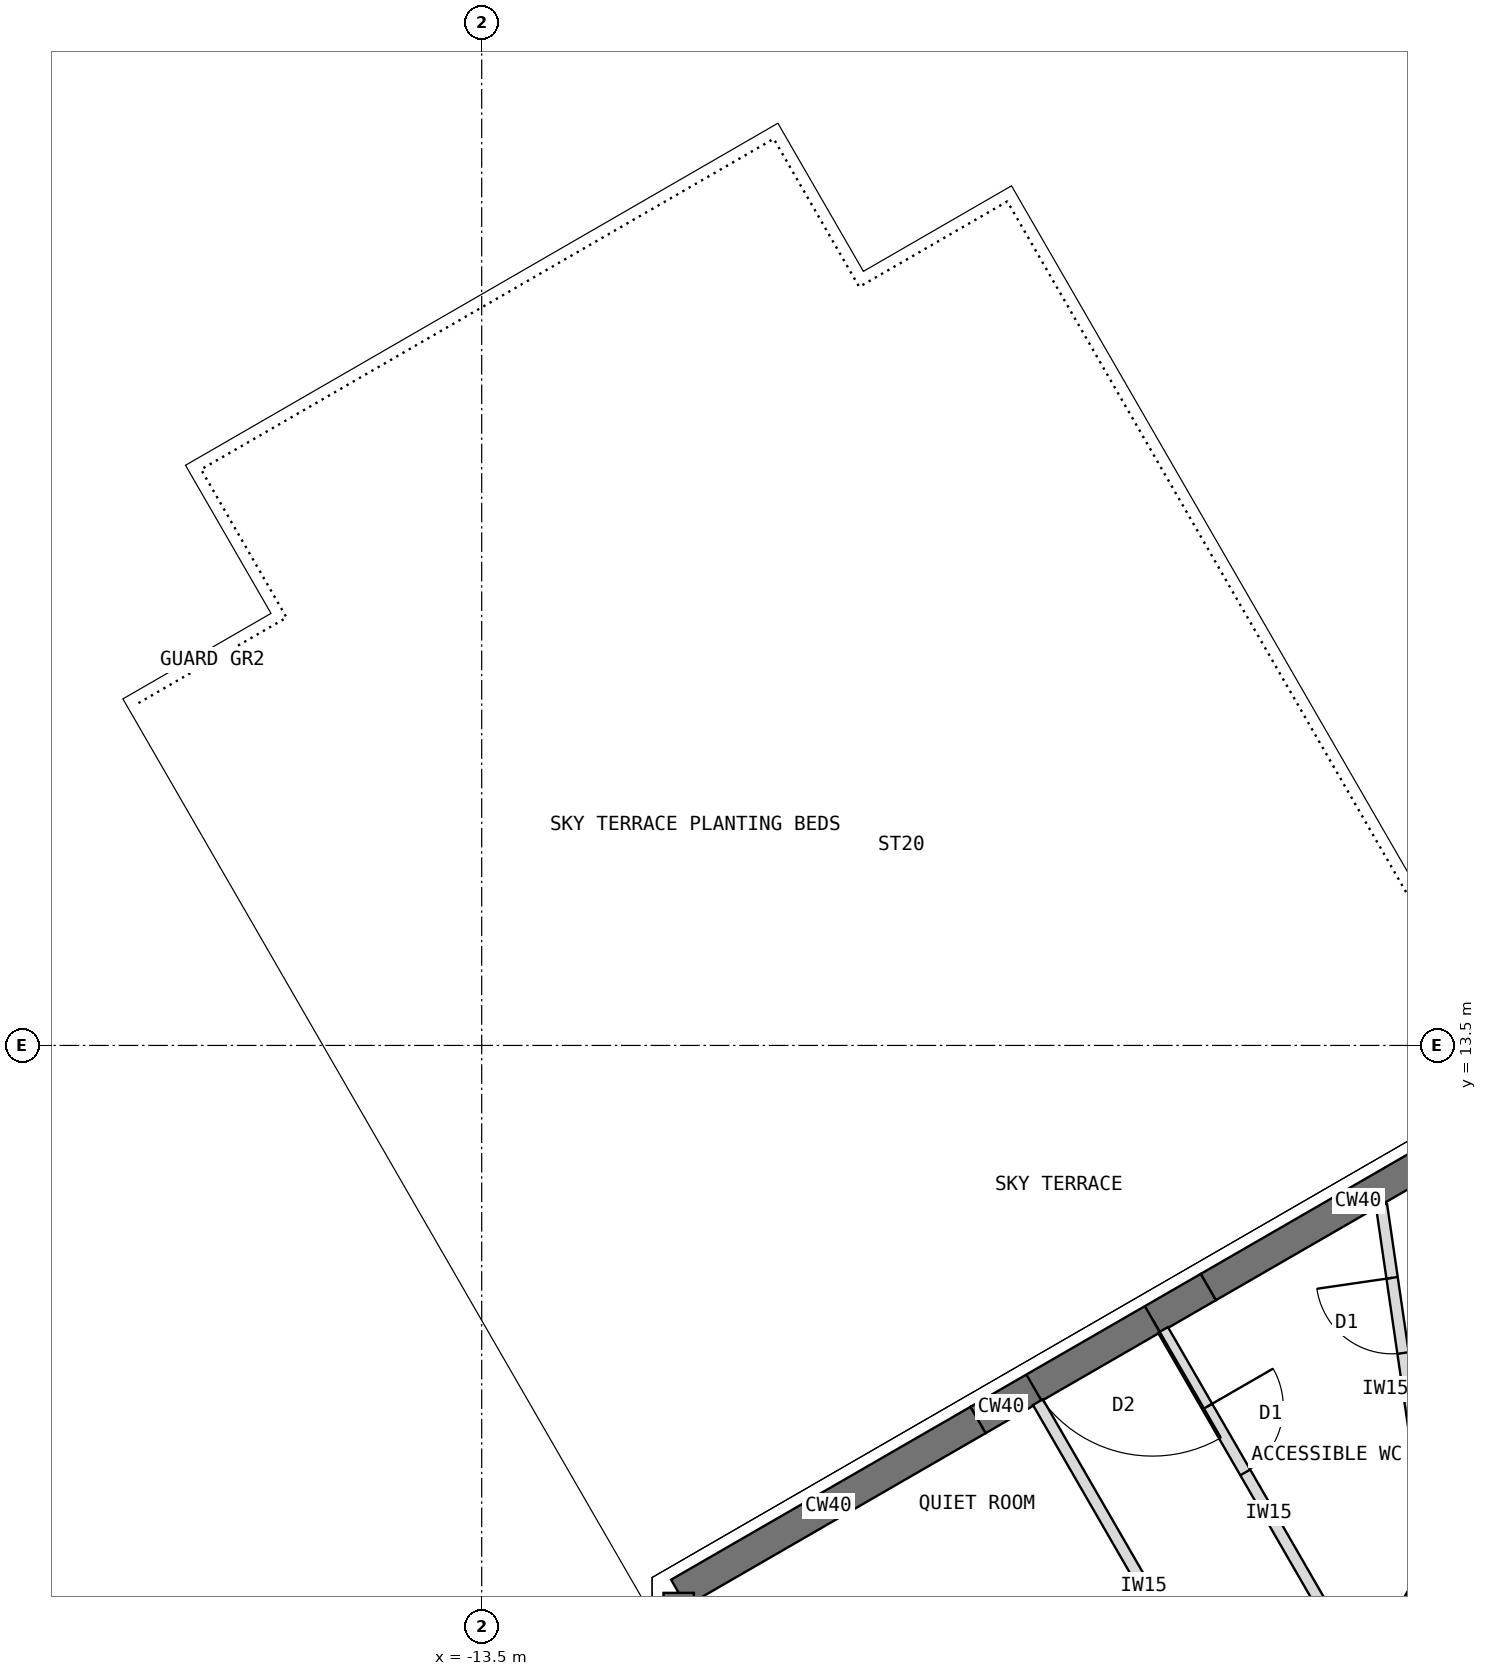
"""IFC4 building model, lengths in metres.
Left out: names, types, materials, properties, quantities, classifications, styles, units other than length and angle.
Written with IfcOpenShell. Run it as: python <this file> out.ifc"""

import sys

from ifc_helpers import new_model, si_unit, direction, frame, frame_2d, origin, place, context, subcontext, project, spatial, rectangle, extrude, element, fill, save


model = new_model("IFC4")
c1 = context("Model", 3, precision=1e-05, world=origin(), true_north=direction((0.0, 1.0)))
c2 = subcontext(c1, "Body", "Model", "MODEL_VIEW")
j1 = project(units=[si_unit("LENGTHUNIT", "METRE"), si_unit("PLANEANGLEUNIT", "RADIAN")], contexts=[c1])
p1 = place(None, origin())
s1 = spatial("IfcSite", under=j1, at=p1, CompositionType="ELEMENT")
p2 = place(p1, origin())
s2 = spatial("IfcBuilding", under=s1, at=p2, CompositionType="ELEMENT")
p3 = place(p2, frame((0.0, 0.0, 243.5)))
s3 = spatial("IfcBuildingStorey", under=s2, at=p3, CompositionType="ELEMENT", Elevation=243.5)
p4 = place(p3, frame((0.0, 12.596, 0.0), z_axis=(0.0, 0.0, 1.0), x_axis=(-0.866011268655, -0.500024481964, 0.0)))
e1 = element("IfcWall", 1, at=p4, inside=s3, PredefinedType="SHEAR", context=c2, shape_type="SweptSolid", body=[
    extrude(rectangle(XDim=4.548, YDim=0.4, at=frame_2d((2.274, 0.0))), origin(), (0.0, 0.0, 1.0), 4.0),
])
p5 = place(p3, frame((-3.939, 10.322, 0.0), z_axis=(0.0, 0.0, 1.0), x_axis=(-0.866019471182, -0.500010275428, 0.0)))
e2 = element("IfcWall", 2, at=p5, inside=s3, PredefinedType="SHEAR", context=c2, shape_type="SweptSolid", body=[
    extrude(rectangle(XDim=3.5, YDim=0.4, at=frame_2d((1.75, 0.0))), origin(), (0.0, 0.0, 1.0), 4.0),
])
p6 = place(p5, frame((0.85, 0.0, 0.0)))
e3 = element("IfcOpeningElement", 3, at=p6, cuts=e2, PredefinedType="OPENING", context=c2, shape_type="SweptSolid", body=[
    extrude(rectangle(XDim=1.8, YDim=2.1, at=frame_2d((0.9, 1.05))), frame((0.0, 0.21, 0.0), z_axis=(0.0, -1.0, 0.0), x_axis=(1.0, 0.0, 0.0)), (0.0, 0.0, 1.0), 0.42),
])
p7 = place(p3, frame((-6.97, 8.572, 0.0), z_axis=(0.0, 0.0, 1.0), x_axis=(-0.866034513004, -0.499984222037, 0.0)))
e4 = element("IfcWall", 4, at=p7, inside=s3, PredefinedType="SHEAR", context=c2, shape_type="SweptSolid", body=[
    extrude(rectangle(XDim=4.548, YDim=0.4, at=frame_2d((2.274, 0.0))), origin(), (0.0, 0.0, 1.0), 4.0),
])
p8 = place(p3, frame((-10.908, 6.298, 0.0), z_axis=(0.0, 0.0, 1.0), x_axis=(0.0, -1.0, 0.0)))
e5 = element("IfcWall", 5, at=p8, inside=s3, PredefinedType="SHEAR", context=c2, shape_type="SweptSolid", body=[
    extrude(rectangle(XDim=12.596, YDim=0.4, at=frame_2d((6.298, 0.0))), origin(), (0.0, 0.0, 1.0), 4.0),
])
p9 = place(p3, frame((-1.201, 6.12, 0.0), z_axis=(0.0, 0.0, 1.0), x_axis=(0.499997979876, 0.866026570101, 0.0)))
e6 = element("IfcWall", 6, at=p9, inside=s3, PredefinedType="SHEAR", context=c2, shape_type="SweptSolid", body=[
    extrude(rectangle(XDim=6.008, YDim=0.4, at=frame_2d((3.004, 0.0))), origin(), (0.0, 0.0, 1.0), 4.0),
])
p10 = place(p3, frame((-3.396, 3.983, 0.0), z_axis=(0.0, 0.0, 1.0), x_axis=(-0.499980410194, 0.866036713669, 0.0)))
e7 = element("IfcWall", 7, at=p10, inside=s3, PredefinedType="PARTITIONING", context=c2, shape_type="SweptSolid", body=[
    extrude(rectangle(XDim=5.571, YDim=0.15, at=frame_2d((2.786, 0.0))), origin(), (0.0, 0.0, 1.0), 3.8),
])
p11 = place(p10, frame((1.186, 0.0, 0.0)))
e8 = element("IfcOpeningElement", 8, at=p11, cuts=e7, PredefinedType="OPENING", context=c2, shape_type="SweptSolid", body=[
    extrude(rectangle(XDim=1.0, YDim=2.1, at=frame_2d((0.5, 1.05))), frame((0.0, 0.085, 0.0), z_axis=(0.0, -1.0, 0.0), x_axis=(1.0, 0.0, 0.0)), (0.0, 0.0, 1.0), 0.17),
])
p12 = place(p3, frame((-4.536, 9.757, 0.0), z_axis=(0.0, 0.0, 1.0), x_axis=(0.499980410194, -0.866036713669, 0.0)))
e9 = element("IfcWall", 9, at=p12, inside=s3, PredefinedType="PARTITIONING", context=c2, shape_type="SweptSolid", body=[
    extrude(rectangle(XDim=5.571, YDim=0.15, at=frame_2d((2.786, 0.0))), origin(), (0.0, 0.0, 1.0), 3.8),
])
p13 = place(p12, frame((1.165, 0.0, 0.0)))
e10 = element("IfcOpeningElement", 10, at=p13, cuts=e9, PredefinedType="OPENING", context=c2, shape_type="SweptSolid", body=[
    extrude(rectangle(XDim=1.0, YDim=2.1, at=frame_2d((0.5, 1.05))), frame((0.0, 0.085, 0.0), z_axis=(0.0, -1.0, 0.0), x_axis=(1.0, 0.0, 0.0)), (0.0, 0.0, 1.0), 0.17),
])
p14 = place(p3, frame((-0.954, 6.547, 0.0), z_axis=(0.0, 0.0, 1.0), x_axis=(-0.144261243656, 0.989539637194, 0.0)))
e11 = element("IfcWall", 11, at=p14, inside=s3, PredefinedType="PARTITIONING", context=c2, shape_type="SweptSolid", body=[
    extrude(rectangle(XDim=4.909, YDim=0.15, at=frame_2d((2.455, 0.0))), origin(), (0.0, 0.0, 1.0), 3.8),
])
p15 = place(p14, frame((2.937, 0.0, 0.0)))
e12 = element("IfcOpeningElement", 12, at=p15, cuts=e11, PredefinedType="OPENING", context=c2, shape_type="SweptSolid", body=[
    extrude(rectangle(XDim=1.0, YDim=2.1, at=frame_2d((0.5, 1.05))), frame((0.0, 0.085, 0.0), z_axis=(0.0, -1.0, 0.0), x_axis=(1.0, 0.0, 0.0)), (0.0, 0.0, 1.0), 0.17),
])
p16 = place(p6, origin())
e13 = element("IfcDoor", 13, at=p16, inside=s3, OperationType="DOUBLE_DOOR_DOUBLE_SWING", PredefinedType="DOOR", context=c2, shape_type="SweptSolid", body=[
    extrude(rectangle(XDim=1.8, YDim=2.1, at=frame_2d((0.9, 1.05))), frame((0.0, 0.025, 0.0), z_axis=(0.0, -1.0, 0.0), x_axis=(1.0, 0.0, 0.0)), (0.0, 0.0, 1.0), 0.05),
])
fill(e3, e13)
p17 = place(p13, origin())
e14 = element("IfcDoor", 14, at=p17, inside=s3, OperationType="SINGLE_SWING_LEFT", PredefinedType="DOOR", context=c2, shape_type="SweptSolid", body=[
    extrude(rectangle(XDim=1.0, YDim=2.1, at=frame_2d((0.5, 1.05))), frame((0.0, 0.025, 0.0), z_axis=(0.0, -1.0, 0.0), x_axis=(1.0, 0.0, 0.0)), (0.0, 0.0, 1.0), 0.05),
])
fill(e10, e14)
p18 = place(p15, origin())
e15 = element("IfcDoor", 15, at=p18, inside=s3, OperationType="SINGLE_SWING_RIGHT", PredefinedType="DOOR", context=c2, shape_type="SweptSolid", body=[
    extrude(rectangle(XDim=1.0, YDim=2.1, at=frame_2d((0.5, 1.05))), frame((0.0, 0.025, 0.0), z_axis=(0.0, -1.0, 0.0), x_axis=(1.0, 0.0, 0.0)), (0.0, 0.0, 1.0), 0.05),
])
fill(e12, e15)
save(model, sys.argv[1])
